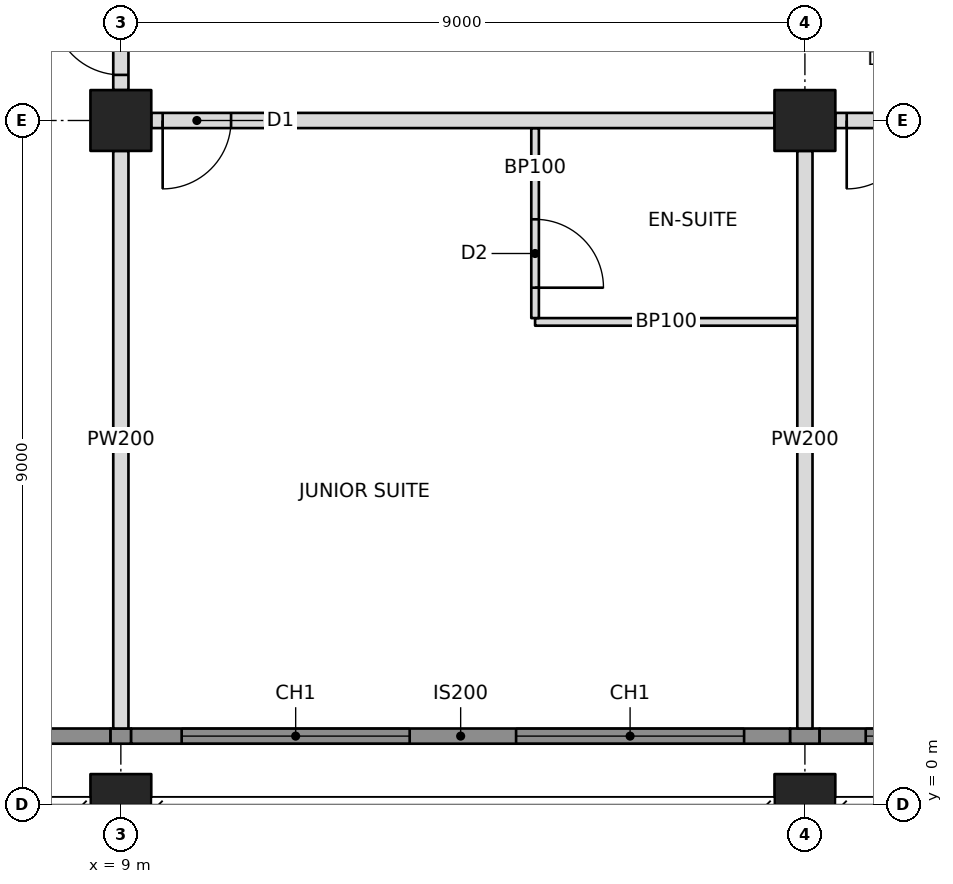
"""IFC4 building model, lengths in metres.
Left out: names, types, materials, properties, quantities, classifications, styles, units other than length and angle.
Written with IfcOpenShell. Run it as: python <this file> out.ifc"""

import sys

from ifc_helpers import new_model, si_unit, direction, frame, frame_2d, origin, origin_2d, place, context, subcontext, project, spatial, rectangle, hollow_rectangle, extrude, element, fill, save


model = new_model("IFC4")
c1 = context("Model", 3, precision=1e-05, world=origin(), true_north=direction((0.0, 1.0)))
c2 = subcontext(c1, "Body", "Model", "MODEL_VIEW")
j1 = project(units=[si_unit("LENGTHUNIT", "METRE"), si_unit("PLANEANGLEUNIT", "RADIAN")], contexts=[c1])
p1 = place(None, origin())
s1 = spatial("IfcSite", under=j1, at=p1, CompositionType="ELEMENT")
p2 = place(p1, origin())
s2 = spatial("IfcBuilding", under=s1, at=p2, CompositionType="ELEMENT")
p3 = place(p2, frame((0.0, 0.0, 174.0)))
s3 = spatial("IfcBuildingStorey", under=s2, at=p3, CompositionType="ELEMENT", Elevation=174.0)
p4 = place(p3, frame((9.0, 0.0, 0.0), z_axis=(0.0, 0.0, 1.0), x_axis=(1.0, 0.0, 0.0)))
e1 = element("IfcColumn", 1, at=p4, inside=s3, PredefinedType="COLUMN", context=c2, shape_type="SweptSolid", body=[
    extrude(hollow_rectangle(XDim=0.8, YDim=0.8, WallThickness=0.07, at=origin_2d()), origin(), (0.0, 0.0, 1.0), 3.4),
])
p5 = place(p3, frame((9.0, 9.0, 0.0), z_axis=(0.0, 0.0, 1.0), x_axis=(1.0, 0.0, 0.0)))
e2 = element("IfcColumn", 2, at=p5, inside=s3, PredefinedType="COLUMN", context=c2, shape_type="SweptSolid", body=[
    extrude(hollow_rectangle(XDim=0.8, YDim=0.8, WallThickness=0.06, at=origin_2d()), origin(), (0.0, 0.0, 1.0), 3.4),
])
p6 = place(p3, frame((18.0, 0.0, 0.0), z_axis=(0.0, 0.0, 1.0), x_axis=(1.0, 0.0, 0.0)))
e3 = element("IfcColumn", 3, at=p6, inside=s3, PredefinedType="COLUMN", context=c2, shape_type="SweptSolid", body=[
    extrude(hollow_rectangle(XDim=0.8, YDim=0.8, WallThickness=0.07, at=origin_2d()), origin(), (0.0, 0.0, 1.0), 3.4),
])
p7 = place(p3, frame((18.0, 9.0, 0.0), z_axis=(0.0, 0.0, 1.0), x_axis=(1.0, 0.0, 0.0)))
e4 = element("IfcColumn", 4, at=p7, inside=s3, PredefinedType="COLUMN", context=c2, shape_type="SweptSolid", body=[
    extrude(hollow_rectangle(XDim=0.8, YDim=0.8, WallThickness=0.06, at=origin_2d()), origin(), (0.0, 0.0, 1.0), 3.4),
])
p8 = place(p3, frame((3.0, 0.9, 0.0), z_axis=(0.0, 0.0, 1.0), x_axis=(1.0, 0.0, 0.0)))
e5 = element("IfcWall", 5, at=p8, inside=s3, PredefinedType="SOLIDWALL", context=c2, shape_type="SweptSolid", body=[
    extrude(rectangle(XDim=5.865, YDim=0.2, at=frame_2d((2.932, 0.0))), origin(), (0.0, 0.0, 1.0), 3.2),
])
p9 = place(p8, frame((1.45, 0.0, 0.6)))
e6 = element("IfcOpeningElement", 6, at=p9, cuts=e5, PredefinedType="OPENING", context=c2, shape_type="SweptSolid", body=[
    extrude(rectangle(XDim=3.0, YDim=2.2, at=frame_2d((1.5, 1.1))), frame((0.0, 0.11, 0.0), z_axis=(0.0, -1.0, 0.0), x_axis=(1.0, 0.0, 0.0)), (0.0, 0.0, 1.0), 0.22),
])
p10 = place(p3, frame((9.4, 9.0, 0.0), z_axis=(0.0, 0.0, 1.0), x_axis=(1.0, 0.0, 0.0)))
e7 = element("IfcWall", 7, at=p10, inside=s3, PredefinedType="PARTITIONING", context=c2, shape_type="SweptSolid", body=[
    extrude(rectangle(XDim=8.2, YDim=0.2, at=frame_2d((4.1, 0.0))), origin(), (0.0, 0.0, 1.0), 2.405),
])
p11 = place(p10, frame((0.15, 0.0, 0.0)))
e8 = element("IfcOpeningElement", 8, at=p11, cuts=e7, PredefinedType="OPENING", context=c2, shape_type="SweptSolid", body=[
    extrude(rectangle(XDim=0.9, YDim=2.1, at=frame_2d((0.45, 1.05))), frame((0.0, 0.11, 0.0), z_axis=(0.0, -1.0, 0.0), x_axis=(1.0, 0.0, 0.0)), (0.0, 0.0, 1.0), 0.22),
])
p12 = place(p3, frame((18.4, 9.0, 0.0), z_axis=(0.0, 0.0, 1.0), x_axis=(1.0, 0.0, 0.0)))
e9 = element("IfcWall", 9, at=p12, inside=s3, PredefinedType="PARTITIONING", context=c2, shape_type="SweptSolid", body=[
    extrude(rectangle(XDim=8.2, YDim=0.2, at=frame_2d((4.1, 0.0))), origin(), (0.0, 0.0, 1.0), 2.405),
])
p13 = place(p12, frame((0.15, 0.0, 0.0)))
e10 = element("IfcOpeningElement", 10, at=p13, cuts=e9, PredefinedType="OPENING", context=c2, shape_type="SweptSolid", body=[
    extrude(rectangle(XDim=0.9, YDim=2.1, at=frame_2d((0.45, 1.05))), frame((0.0, 0.11, 0.0), z_axis=(0.0, -1.0, 0.0), x_axis=(1.0, 0.0, 0.0)), (0.0, 0.0, 1.0), 0.22),
])
p14 = place(p3, frame((9.0, 8.6, 0.0), z_axis=(0.0, 0.0, 1.0), x_axis=(0.0, -1.0, 0.0)))
e11 = element("IfcWall", 11, at=p14, inside=s3, PredefinedType="PARTITIONING", context=c2, shape_type="SweptSolid", body=[
    extrude(rectangle(XDim=7.6, YDim=0.2, at=frame_2d((3.8, 0.0))), origin(), (0.0, 0.0, 1.0), 2.438),
])
p15 = place(p3, frame((18.0, 8.6, 0.0), z_axis=(0.0, 0.0, 1.0), x_axis=(0.0, -1.0, 0.0)))
e12 = element("IfcWall", 12, at=p15, inside=s3, PredefinedType="PARTITIONING", context=c2, shape_type="SweptSolid", body=[
    extrude(rectangle(XDim=7.6, YDim=0.2, at=frame_2d((3.8, 0.0))), origin(), (0.0, 0.0, 1.0), 2.405),
])
p16 = place(p3, frame((14.45, 6.35, 0.0), z_axis=(0.0, 0.0, 1.0), x_axis=(1.0, 0.0, 0.0)))
e13 = element("IfcWall", 13, at=p16, inside=s3, PredefinedType="PARTITIONING", context=c2, shape_type="SweptSolid", body=[
    extrude(rectangle(XDim=3.45, YDim=0.1, at=frame_2d((1.725, 0.0))), origin(), (0.0, 0.0, 1.0), 2.404),
])
p17 = place(p3, frame((14.45, 8.9, 0.0), z_axis=(0.0, 0.0, 1.0), x_axis=(0.0, -1.0, 0.0)))
e14 = element("IfcWall", 14, at=p17, inside=s3, PredefinedType="PARTITIONING", context=c2, shape_type="SweptSolid", body=[
    extrude(rectangle(XDim=2.5, YDim=0.1, at=frame_2d((1.25, 0.0))), origin(), (0.0, 0.0, 1.0), 2.404),
])
p18 = place(p17, frame((1.2, 0.0, 0.0)))
e15 = element("IfcOpeningElement", 15, at=p18, cuts=e14, PredefinedType="OPENING", context=c2, shape_type="SweptSolid", body=[
    extrude(rectangle(XDim=0.9, YDim=2.1, at=frame_2d((0.45, 1.05))), frame((0.0, 0.06, 0.0), z_axis=(0.0, -1.0, 0.0), x_axis=(1.0, 0.0, 0.0)), (0.0, 0.0, 1.0), 0.12),
])
p19 = place(p3, frame((9.0, 9.4, 0.0), z_axis=(0.0, 0.0, 1.0), x_axis=(0.0, 1.0, 0.0)))
e16 = element("IfcWall", 16, at=p19, inside=s3, PredefinedType="PARTITIONING", context=c2, shape_type="SweptSolid", body=[
    extrude(rectangle(XDim=1.3, YDim=0.2, at=frame_2d((0.65, 0.0))), origin(), (0.0, 0.0, 1.0), 2.405),
])
p20 = place(p19, frame((0.2, 0.0, 0.0)))
e17 = element("IfcOpeningElement", 17, at=p20, cuts=e16, PredefinedType="OPENING", context=c2, shape_type="SweptSolid", body=[
    extrude(rectangle(XDim=0.9, YDim=2.1, at=frame_2d((0.45, 1.05))), frame((0.0, 0.11, 0.0), z_axis=(0.0, -1.0, 0.0), x_axis=(1.0, 0.0, 0.0)), (0.0, 0.0, 1.0), 0.22),
])
p21 = place(p3, frame((8.865, 0.9, 0.0), z_axis=(0.0, 0.0, 1.0), x_axis=(1.0, 0.0, 0.0)))
e18 = element("IfcWall", 18, at=p21, inside=s3, PredefinedType="SOLIDWALL", context=c2, shape_type="SweptSolid", body=[
    extrude(rectangle(XDim=0.271, YDim=0.2, at=frame_2d((0.135, 0.0))), origin(), (0.0, 0.0, 1.0), 2.438),
])
p22 = place(p3, frame((9.135, 0.9, 0.0), z_axis=(0.0, 0.0, 1.0), x_axis=(1.0, 0.0, 0.0)))
e19 = element("IfcWall", 19, at=p22, inside=s3, PredefinedType="SOLIDWALL", context=c2, shape_type="SweptSolid", body=[
    extrude(rectangle(XDim=8.671, YDim=0.2, at=frame_2d((4.335, 0.0))), origin(), (0.0, 0.0, 1.0), 3.2),
])
p23 = place(p22, frame((0.665, 0.0, 0.6)))
e20 = element("IfcOpeningElement", 20, at=p23, cuts=e19, PredefinedType="OPENING", context=c2, shape_type="SweptSolid", body=[
    extrude(rectangle(XDim=3.0, YDim=2.2, at=frame_2d((1.5, 1.1))), frame((0.0, 0.11, 0.0), z_axis=(0.0, -1.0, 0.0), x_axis=(1.0, 0.0, 0.0)), (0.0, 0.0, 1.0), 0.22),
])
p24 = place(p22, frame((5.065, 0.0, 0.6)))
e21 = element("IfcOpeningElement", 21, at=p24, cuts=e19, PredefinedType="OPENING", context=c2, shape_type="SweptSolid", body=[
    extrude(rectangle(XDim=3.0, YDim=2.2, at=frame_2d((1.5, 1.1))), frame((0.0, 0.11, 0.0), z_axis=(0.0, -1.0, 0.0), x_axis=(1.0, 0.0, 0.0)), (0.0, 0.0, 1.0), 0.22),
])
p25 = place(p3, frame((17.806, 0.9, 0.0), z_axis=(0.0, 0.0, 1.0), x_axis=(1.0, 0.0, 0.0)))
e22 = element("IfcWall", 22, at=p25, inside=s3, PredefinedType="SOLIDWALL", context=c2, shape_type="SweptSolid", body=[
    extrude(rectangle(XDim=0.388, YDim=0.2, at=frame_2d((0.194, 0.0))), origin(), (0.0, 0.0, 1.0), 2.404),
])
p26 = place(p3, frame((18.194, 0.9, 0.0), z_axis=(0.0, 0.0, 1.0), x_axis=(1.0, 0.0, 0.0)))
e23 = element("IfcWall", 23, at=p26, inside=s3, PredefinedType="SOLIDWALL", context=c2, shape_type="SweptSolid", body=[
    extrude(rectangle(XDim=8.612, YDim=0.2, at=frame_2d((4.306, 0.0))), origin(), (0.0, 0.0, 1.0), 3.2),
])
p27 = place(p26, frame((0.606, 0.0, 0.6)))
e24 = element("IfcOpeningElement", 24, at=p27, cuts=e23, PredefinedType="OPENING", context=c2, shape_type="SweptSolid", body=[
    extrude(rectangle(XDim=3.0, YDim=2.2, at=frame_2d((1.5, 1.1))), frame((0.0, 0.11, 0.0), z_axis=(0.0, -1.0, 0.0), x_axis=(1.0, 0.0, 0.0)), (0.0, 0.0, 1.0), 0.22),
])
p28 = place(p26, frame((5.006, 0.0, 0.6)))
e25 = element("IfcOpeningElement", 25, at=p28, cuts=e23, PredefinedType="OPENING", context=c2, shape_type="SweptSolid", body=[
    extrude(rectangle(XDim=3.0, YDim=2.2, at=frame_2d((1.5, 1.1))), frame((0.0, 0.11, 0.0), z_axis=(0.0, -1.0, 0.0), x_axis=(1.0, 0.0, 0.0)), (0.0, 0.0, 1.0), 0.22),
])
p29 = place(p23, origin())
e26 = element("IfcWindow", 26, at=p29, inside=s3, PartitioningType="TRIPLE_PANEL_VERTICAL", PredefinedType="WINDOW", context=c2, shape_type="SweptSolid", body=[
    extrude(rectangle(XDim=3.0, YDim=2.2, at=frame_2d((1.5, 1.1))), frame((0.0, 0.03, 0.0), z_axis=(0.0, -1.0, 0.0), x_axis=(1.0, 0.0, 0.0)), (0.0, 0.0, 1.0), 0.06),
])
fill(e20, e26)
p30 = place(p24, origin())
e27 = element("IfcWindow", 27, at=p30, inside=s3, PartitioningType="TRIPLE_PANEL_VERTICAL", PredefinedType="WINDOW", context=c2, shape_type="SweptSolid", body=[
    extrude(rectangle(XDim=3.0, YDim=2.2, at=frame_2d((1.5, 1.1))), frame((0.0, 0.03, 0.0), z_axis=(0.0, -1.0, 0.0), x_axis=(1.0, 0.0, 0.0)), (0.0, 0.0, 1.0), 0.06),
])
fill(e21, e27)
p31 = place(p27, origin())
e28 = element("IfcWindow", 28, at=p31, inside=s3, PartitioningType="TRIPLE_PANEL_VERTICAL", PredefinedType="WINDOW", context=c2, shape_type="SweptSolid", body=[
    extrude(rectangle(XDim=3.0, YDim=2.2, at=frame_2d((1.5, 1.1))), frame((0.0, 0.03, 0.0), z_axis=(0.0, -1.0, 0.0), x_axis=(1.0, 0.0, 0.0)), (0.0, 0.0, 1.0), 0.06),
])
fill(e24, e28)
p32 = place(p18, origin())
e29 = element("IfcDoor", 29, at=p32, inside=s3, OperationType="SINGLE_SWING_RIGHT", PredefinedType="DOOR", context=c2, shape_type="SweptSolid", body=[
    extrude(rectangle(XDim=0.9, YDim=2.1, at=frame_2d((0.45, 1.05))), frame((0.0, 0.025, 0.0), z_axis=(0.0, -1.0, 0.0), x_axis=(1.0, 0.0, 0.0)), (0.0, 0.0, 1.0), 0.05),
])
fill(e15, e29)
p33 = place(p11, frame((0.9, 0.0, 0.0), z_axis=(0.0, 0.0, 1.0), x_axis=(-1.0, 0.0, 0.0)))
e30 = element("IfcDoor", 30, at=p33, inside=s3, OperationType="SINGLE_SWING_RIGHT", PredefinedType="DOOR", context=c2, shape_type="SweptSolid", body=[
    extrude(rectangle(XDim=0.9, YDim=2.1, at=frame_2d((0.45, 1.05))), frame((0.0, 0.025, 0.0), z_axis=(0.0, -1.0, 0.0), x_axis=(1.0, 0.0, 0.0)), (0.0, 0.0, 1.0), 0.05),
])
fill(e8, e30)
p34 = place(p13, frame((0.9, 0.0, 0.0), z_axis=(0.0, 0.0, 1.0), x_axis=(-1.0, 0.0, 0.0)))
e31 = element("IfcDoor", 31, at=p34, inside=s3, OperationType="SINGLE_SWING_RIGHT", PredefinedType="DOOR", context=c2, shape_type="SweptSolid", body=[
    extrude(rectangle(XDim=0.9, YDim=2.1, at=frame_2d((0.45, 1.05))), frame((0.0, 0.025, 0.0), z_axis=(0.0, -1.0, 0.0), x_axis=(1.0, 0.0, 0.0)), (0.0, 0.0, 1.0), 0.05),
])
fill(e10, e31)
p35 = place(p20, origin())
e32 = element("IfcDoor", 32, at=p35, inside=s3, OperationType="SINGLE_SWING_RIGHT", PredefinedType="DOOR", context=c2, shape_type="SweptSolid", body=[
    extrude(rectangle(XDim=0.9, YDim=2.1, at=frame_2d((0.45, 1.05))), frame((0.0, 0.025, 0.0), z_axis=(0.0, -1.0, 0.0), x_axis=(1.0, 0.0, 0.0)), (0.0, 0.0, 1.0), 0.05),
])
fill(e17, e32)
save(model, sys.argv[1])
